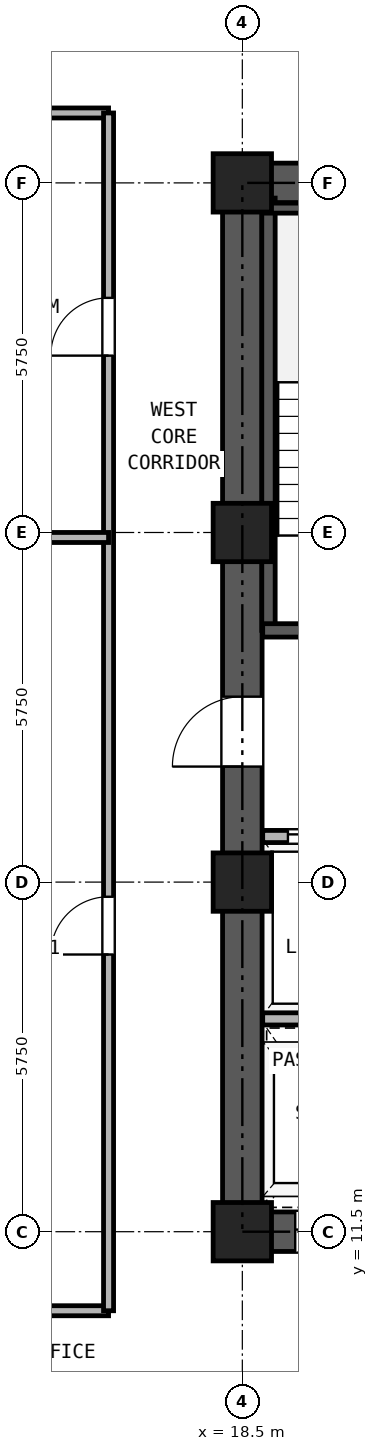
"""IFC4 building model, lengths in metres.
Left out: names, types, materials, properties, quantities, classifications, styles, units other than length and angle.
Written with IfcOpenShell. Run it as: python <this file> out.ifc"""

import sys

from ifc_helpers import new_model, si_unit, direction, frame, frame_2d, origin, origin_2d, place, context, subcontext, project, spatial, rectangle, hollow_rectangle, extrude, source, transform, mapped, element, fill, save


model = new_model("IFC4")
c1 = context("Model", 3, precision=1e-05, world=origin(), true_north=direction((0.0, 1.0)))
c2 = subcontext(c1, "Body", "Model", "MODEL_VIEW")
j1 = project(units=[si_unit("LENGTHUNIT", "METRE"), si_unit("PLANEANGLEUNIT", "RADIAN")], contexts=[c1])
p1 = place(None, origin())
s1 = spatial("IfcSite", under=j1, at=p1, CompositionType="ELEMENT")
p2 = place(p1, origin())
s2 = spatial("IfcBuilding", under=s1, at=p2, CompositionType="ELEMENT")
p3 = place(p2, frame((0.0, 0.0, 44.1)))
s3 = spatial("IfcBuildingStorey", under=s2, at=p3, CompositionType="ELEMENT", Elevation=44.1)
m1 = source(origin(), c2, "Body", "SweptSolid", [
    extrude(hollow_rectangle(XDim=0.96, YDim=0.96, WallThickness=0.06, at=origin_2d()), origin(), (0.0, 0.0, 1.0), 3.32),
])
for number, where, z_axis, x_axis in (
    (1, (18.5, 11.5, 0.0), (0.0, 0.0, 1.0), (1.0, 0.0, 0.0)),
    (2, (18.5, 17.25, 0.0), (0.0, 0.0, 1.0), (1.0, 0.0, 0.0)),
    (3, (18.5, 23.0, 0.0), (0.0, 0.0, 1.0), (1.0, 0.0, 0.0)),
    (4, (18.5, 28.75, 0.0), (0.0, 0.0, 1.0), (1.0, 0.0, 0.0)),
):
    element("IfcColumn", number, at=place(p3, frame(where, z_axis=z_axis, x_axis=x_axis)), inside=s3, PredefinedType="COLUMN", context=c2, shape_type="MappedRepresentation", body=[
        mapped(m1, transform((0.0, 0.0, 0.0), x_axis=(1.0, 0.0, 0.0), y_axis=(0.0, 1.0, 0.0), z_axis=(0.0, 0.0, 1.0), scale=1.0)),
    ])
p4 = place(p3, frame((18.175, 11.5, 0.0), z_axis=(0.0, 0.0, 1.0), x_axis=(1.0, 0.0, 0.0)))
e5 = element("IfcWall", 5, at=p4, inside=s3, PredefinedType="SHEAR", context=c2, shape_type="SweptSolid", body=[
    extrude(rectangle(XDim=10.65, YDim=0.65, at=frame_2d((5.325, 0.0))), origin(), (0.0, 0.0, 1.0), 3.32),
])
p5 = place(p4, frame((1.195, 0.0, 0.0)))
e6 = element("IfcOpeningElement", 6, at=p5, cuts=e5, PredefinedType="OPENING", context=c2, shape_type="SweptSolid", body=[
    extrude(rectangle(XDim=1.1, YDim=2.25, at=frame_2d((0.55, 1.125))), frame((0.0, 0.335, 0.0), z_axis=(0.0, -1.0, 0.0), x_axis=(1.0, 0.0, 0.0)), (0.0, 0.0, 1.0), 0.67),
])
p6 = place(p4, frame((3.495, 0.0, 0.0)))
e7 = element("IfcOpeningElement", 7, at=p6, cuts=e5, PredefinedType="OPENING", context=c2, shape_type="SweptSolid", body=[
    extrude(rectangle(XDim=1.1, YDim=2.25, at=frame_2d((0.55, 1.125))), frame((0.0, 0.335, 0.0), z_axis=(0.0, -1.0, 0.0), x_axis=(1.0, 0.0, 0.0)), (0.0, 0.0, 1.0), 0.67),
])
p7 = place(p4, frame((5.925, 0.0, 0.0)))
e8 = element("IfcOpeningElement", 8, at=p7, cuts=e5, PredefinedType="OPENING", context=c2, shape_type="SweptSolid", body=[
    extrude(rectangle(XDim=1.1, YDim=2.25, at=frame_2d((0.55, 1.125))), frame((0.0, 0.335, 0.0), z_axis=(0.0, -1.0, 0.0), x_axis=(1.0, 0.0, 0.0)), (0.0, 0.0, 1.0), 0.67),
])
p8 = place(p4, frame((8.325, 0.0, 0.0)))
e9 = element("IfcOpeningElement", 9, at=p8, cuts=e5, PredefinedType="OPENING", context=c2, shape_type="SweptSolid", body=[
    extrude(rectangle(XDim=1.1, YDim=2.25, at=frame_2d((0.55, 1.125))), frame((0.0, 0.335, 0.0), z_axis=(0.0, -1.0, 0.0), x_axis=(1.0, 0.0, 0.0)), (0.0, 0.0, 1.0), 0.67),
])
p9 = place(p3, frame((18.175, 28.75, 0.0), z_axis=(0.0, 0.0, 1.0), x_axis=(1.0, 0.0, 0.0)))
e10 = element("IfcWall", 10, at=p9, inside=s3, PredefinedType="SHEAR", context=c2, shape_type="SweptSolid", body=[
    extrude(rectangle(XDim=10.65, YDim=0.65, at=frame_2d((5.325, 0.0))), origin(), (0.0, 0.0, 1.0), 3.32),
])
p10 = place(p9, frame((4.205, 0.0, 0.0)))
e11 = element("IfcOpeningElement", 11, at=p10, cuts=e10, PredefinedType="OPENING", context=c2, shape_type="SweptSolid", body=[
    extrude(rectangle(XDim=0.9, YDim=2.05, at=frame_2d((0.45, 1.025))), frame((0.0, 0.335, 0.0), z_axis=(0.0, -1.0, 0.0), x_axis=(1.0, 0.0, 0.0)), (0.0, 0.0, 1.0), 0.67),
])
p11 = place(p9, frame((5.745, 0.0, 0.0)))
e12 = element("IfcOpeningElement", 12, at=p11, cuts=e10, PredefinedType="OPENING", context=c2, shape_type="SweptSolid", body=[
    extrude(rectangle(XDim=0.9, YDim=2.05, at=frame_2d((0.45, 1.025))), frame((0.0, 0.335, 0.0), z_axis=(0.0, -1.0, 0.0), x_axis=(1.0, 0.0, 0.0)), (0.0, 0.0, 1.0), 0.67),
])
p12 = place(p3, frame((18.5, 11.825, 0.0), z_axis=(0.0, 0.0, 1.0), x_axis=(0.0, 1.0, 0.0)))
e13 = element("IfcWall", 13, at=p12, inside=s3, PredefinedType="SHEAR", context=c2, shape_type="SweptSolid", body=[
    extrude(rectangle(XDim=16.6, YDim=0.65, at=frame_2d((8.3, 0.0))), origin(), (0.0, 0.0, 1.0), 3.32),
])
p13 = place(p12, frame((7.325, 0.0, 0.0)))
e14 = element("IfcOpeningElement", 14, at=p13, cuts=e13, PredefinedType="OPENING", context=c2, shape_type="SweptSolid", body=[
    extrude(rectangle(XDim=1.15, YDim=2.2, at=frame_2d((0.575, 1.1))), frame((0.0, 0.335, 0.0), z_axis=(0.0, -1.0, 0.0), x_axis=(1.0, 0.0, 0.0)), (0.0, 0.0, 1.0), 0.67),
])
p14 = place(p3, frame((18.93, 21.39, 0.0), z_axis=(0.0, 0.0, 1.0), x_axis=(0.0, 1.0, 0.0)))
e15 = element("IfcWall", 15, at=p14, inside=s3, PredefinedType="SOLIDWALL", context=c2, shape_type="SweptSolid", body=[
    extrude(rectangle(XDim=7.11, YDim=0.22, at=frame_2d((3.555, 0.0))), origin(), (0.0, 0.0, 1.0), 3.32),
])
p15 = place(p3, frame((18.835, 28.335, 0.0), z_axis=(0.0, 0.0, 1.0), x_axis=(1.0, 0.0, 0.0)))
e16 = element("IfcWall", 16, at=p15, inside=s3, PredefinedType="PARTITIONING", context=c2, shape_type="SweptSolid", body=[
    extrude(rectangle(XDim=3.275, YDim=0.165, at=frame_2d((1.638, 0.0))), origin(), (0.0, 0.0, 1.0), 3.32),
])
p16 = place(p3, frame((18.835, 21.39, 0.0), z_axis=(0.0, 0.0, 1.0), x_axis=(1.0, 0.0, 0.0)))
e17 = element("IfcWall", 17, at=p16, inside=s3, PredefinedType="SOLIDWALL", context=c2, shape_type="SweptSolid", body=[
    extrude(rectangle(XDim=6.295, YDim=0.22, at=frame_2d((3.147, 0.0))), origin(), (0.0, 0.0, 1.0), 3.32),
])
p17 = place(p16, frame((1.015, 0.0, 0.0)))
e18 = element("IfcOpeningElement", 18, at=p17, cuts=e17, PredefinedType="OPENING", context=c2, shape_type="SweptSolid", body=[
    extrude(rectangle(XDim=1.15, YDim=2.2, at=frame_2d((0.575, 1.1))), frame((0.0, 0.12, 0.0), z_axis=(0.0, -1.0, 0.0), x_axis=(1.0, 0.0, 0.0)), (0.0, 0.0, 1.0), 0.24),
])
p18 = place(p16, frame((4.745, 0.0, 0.0)))
e19 = element("IfcOpeningElement", 19, at=p18, cuts=e17, PredefinedType="OPENING", context=c2, shape_type="SweptSolid", body=[
    extrude(rectangle(XDim=1.1, YDim=2.25, at=frame_2d((0.55, 1.125))), frame((0.0, 0.12, 0.0), z_axis=(0.0, -1.0, 0.0), x_axis=(1.0, 0.0, 0.0)), (0.0, 0.0, 1.0), 0.24),
])
p19 = place(p3, frame((18.835, 18.0, 0.0), z_axis=(0.0, 0.0, 1.0), x_axis=(1.0, 0.0, 0.0)))
e20 = element("IfcWall", 20, at=p19, inside=s3, PredefinedType="PARTITIONING", context=c2, shape_type="SweptSolid", body=[
    extrude(rectangle(XDim=9.33, YDim=0.2, at=frame_2d((4.665, 0.0))), origin(), (0.0, 0.0, 1.0), 3.32),
])
p20 = place(p19, frame((0.415, 0.0, 0.0)))
e21 = element("IfcOpeningElement", 21, at=p20, cuts=e20, PredefinedType="OPENING", context=c2, shape_type="SweptSolid", body=[
    extrude(rectangle(XDim=1.3, YDim=2.3, at=frame_2d((0.65, 1.15))), frame((0.0, 0.11, 0.0), z_axis=(0.0, -1.0, 0.0), x_axis=(1.0, 0.0, 0.0)), (0.0, 0.0, 1.0), 0.22),
])
p21 = place(p19, frame((2.515, 0.0, 0.0)))
e22 = element("IfcOpeningElement", 22, at=p21, cuts=e20, PredefinedType="OPENING", context=c2, shape_type="SweptSolid", body=[
    extrude(rectangle(XDim=1.3, YDim=2.3, at=frame_2d((0.65, 1.15))), frame((0.0, 0.11, 0.0), z_axis=(0.0, -1.0, 0.0), x_axis=(1.0, 0.0, 0.0)), (0.0, 0.0, 1.0), 0.22),
])
p22 = place(p19, frame((4.935, 0.0, 0.0)))
e23 = element("IfcOpeningElement", 23, at=p22, cuts=e20, PredefinedType="OPENING", context=c2, shape_type="SweptSolid", body=[
    extrude(rectangle(XDim=0.9, YDim=2.05, at=frame_2d((0.45, 1.025))), frame((0.0, 0.11, 0.0), z_axis=(0.0, -1.0, 0.0), x_axis=(1.0, 0.0, 0.0)), (0.0, 0.0, 1.0), 0.22),
])
p23 = place(p19, frame((8.065, 0.0, 0.0)))
e24 = element("IfcOpeningElement", 24, at=p23, cuts=e20, PredefinedType="OPENING", context=c2, shape_type="SweptSolid", body=[
    extrude(rectangle(XDim=0.9, YDim=2.05, at=frame_2d((0.45, 1.025))), frame((0.0, 0.11, 0.0), z_axis=(0.0, -1.0, 0.0), x_axis=(1.0, 0.0, 0.0)), (0.0, 0.0, 1.0), 0.22),
])
p24 = place(p3, frame((18.835, 15.0, 0.0), z_axis=(0.0, 0.0, 1.0), x_axis=(1.0, 0.0, 0.0)))
e25 = element("IfcWall", 25, at=p24, inside=s3, PredefinedType="PARTITIONING", context=c2, shape_type="SweptSolid", body=[
    extrude(rectangle(XDim=9.33, YDim=0.2, at=frame_2d((4.665, 0.0))), origin(), (0.0, 0.0, 1.0), 3.32),
])
for number, where, z_axis, x_axis in (
    (26, (10.6, 10.2, 0.0), (0.0, 0.0, 1.0), (1.0, 0.0, 0.0)),
    (27, (10.6, 29.9, 0.0), (0.0, 0.0, 1.0), (1.0, 0.0, 0.0)),
):
    element("IfcWall", number, at=place(p3, frame(where, z_axis=z_axis, x_axis=x_axis)), inside=s3, PredefinedType="PARTITIONING", context=c2, shape_type="SweptSolid", body=[
        extrude(rectangle(XDim=5.7, YDim=0.165, at=frame_2d((2.85, 0.0))), origin(), (0.0, 0.0, 1.0), 3.32),
    ])
p25 = place(p3, frame((16.3, 10.2, 0.0), z_axis=(0.0, 0.0, 1.0), x_axis=(0.0, 1.0, 0.0)))
e28 = element("IfcWall", 28, at=p25, inside=s3, PredefinedType="PARTITIONING", context=c2, shape_type="SweptSolid", body=[
    extrude(rectangle(XDim=19.7, YDim=0.165, at=frame_2d((9.85, 0.0))), origin(), (0.0, 0.0, 1.0), 3.32),
])
p26 = place(p25, frame((5.859, 0.0, 0.0)))
e29 = element("IfcOpeningElement", 29, at=p26, cuts=e28, PredefinedType="OPENING", context=c2, shape_type="SweptSolid", body=[
    extrude(rectangle(XDim=0.95, YDim=2.15, at=frame_2d((0.475, 1.075))), frame((0.0, 0.093, 0.0), z_axis=(0.0, -1.0, 0.0), x_axis=(1.0, 0.0, 0.0)), (0.0, 0.0, 1.0), 0.185),
])
p27 = place(p25, frame((15.709, 0.0, 0.0)))
e30 = element("IfcOpeningElement", 30, at=p27, cuts=e28, PredefinedType="OPENING", context=c2, shape_type="SweptSolid", body=[
    extrude(rectangle(XDim=0.95, YDim=2.15, at=frame_2d((0.475, 1.075))), frame((0.0, 0.093, 0.0), z_axis=(0.0, -1.0, 0.0), x_axis=(1.0, 0.0, 0.0)), (0.0, 0.0, 1.0), 0.185),
])
p28 = place(p3, frame((10.6, 22.918, 0.0), z_axis=(0.0, 0.0, 1.0), x_axis=(1.0, 0.0, 0.0)))
e31 = element("IfcWall", 31, at=p28, inside=s3, PredefinedType="PARTITIONING", context=c2, shape_type="SweptSolid", body=[
    extrude(rectangle(XDim=5.7, YDim=0.165, at=frame_2d((2.85, 0.0))), origin(), (0.0, 0.0, 1.0), 2.539),
])
p29 = place(p20, origin())
e32 = element("IfcDoor", 32, at=p29, inside=s3, OperationType="DOUBLE_DOOR_SLIDING", PredefinedType="DOOR", context=c2, shape_type="SweptSolid", body=[
    extrude(rectangle(XDim=1.3, YDim=2.3, at=frame_2d((0.65, 1.15))), frame((0.0, 0.025, 0.0), z_axis=(0.0, -1.0, 0.0), x_axis=(1.0, 0.0, 0.0)), (0.0, 0.0, 1.0), 0.05),
])
fill(e21, e32)
p30 = place(p13, frame((1.15, 0.0, 0.0), z_axis=(0.0, 0.0, 1.0), x_axis=(-1.0, 0.0, 0.0)))
e33 = element("IfcDoor", 33, at=p30, inside=s3, OperationType="SINGLE_SWING_LEFT", PredefinedType="DOOR", context=c2, shape_type="SweptSolid", body=[
    extrude(rectangle(XDim=1.15, YDim=2.2, at=frame_2d((0.575, 1.1))), frame((0.0, 0.025, 0.0), z_axis=(0.0, -1.0, 0.0), x_axis=(1.0, 0.0, 0.0)), (0.0, 0.0, 1.0), 0.05),
])
fill(e14, e33)
p31 = place(p5, frame((1.1, 0.0, 0.0), z_axis=(0.0, 0.0, 1.0), x_axis=(-1.0, 0.0, 0.0)))
e34 = element("IfcDoor", 34, at=p31, inside=s3, OperationType="DOUBLE_DOOR_SLIDING", PredefinedType="DOOR", context=c2, shape_type="SweptSolid", body=[
    extrude(rectangle(XDim=1.1, YDim=2.25, at=frame_2d((0.55, 1.125))), frame((0.0, 0.025, 0.0), z_axis=(0.0, -1.0, 0.0), x_axis=(1.0, 0.0, 0.0)), (0.0, 0.0, 1.0), 0.05),
])
fill(e6, e34)
p32 = place(p26, frame((0.95, 0.0, 0.0), z_axis=(0.0, 0.0, 1.0), x_axis=(-1.0, 0.0, 0.0)))
e35 = element("IfcDoor", 35, at=p32, inside=s3, OperationType="SINGLE_SWING_LEFT", PredefinedType="DOOR", context=c2, shape_type="SweptSolid", body=[
    extrude(rectangle(XDim=0.95, YDim=2.15, at=frame_2d((0.475, 1.075))), frame((0.0, 0.025, 0.0), z_axis=(0.0, -1.0, 0.0), x_axis=(1.0, 0.0, 0.0)), (0.0, 0.0, 1.0), 0.05),
])
fill(e29, e35)
p33 = place(p27, frame((0.95, 0.0, 0.0), z_axis=(0.0, 0.0, 1.0), x_axis=(-1.0, 0.0, 0.0)))
e36 = element("IfcDoor", 36, at=p33, inside=s3, OperationType="SINGLE_SWING_LEFT", PredefinedType="DOOR", context=c2, shape_type="SweptSolid", body=[
    extrude(rectangle(XDim=0.95, YDim=2.15, at=frame_2d((0.475, 1.075))), frame((0.0, 0.025, 0.0), z_axis=(0.0, -1.0, 0.0), x_axis=(1.0, 0.0, 0.0)), (0.0, 0.0, 1.0), 0.05),
])
fill(e30, e36)
save(model, sys.argv[1])
